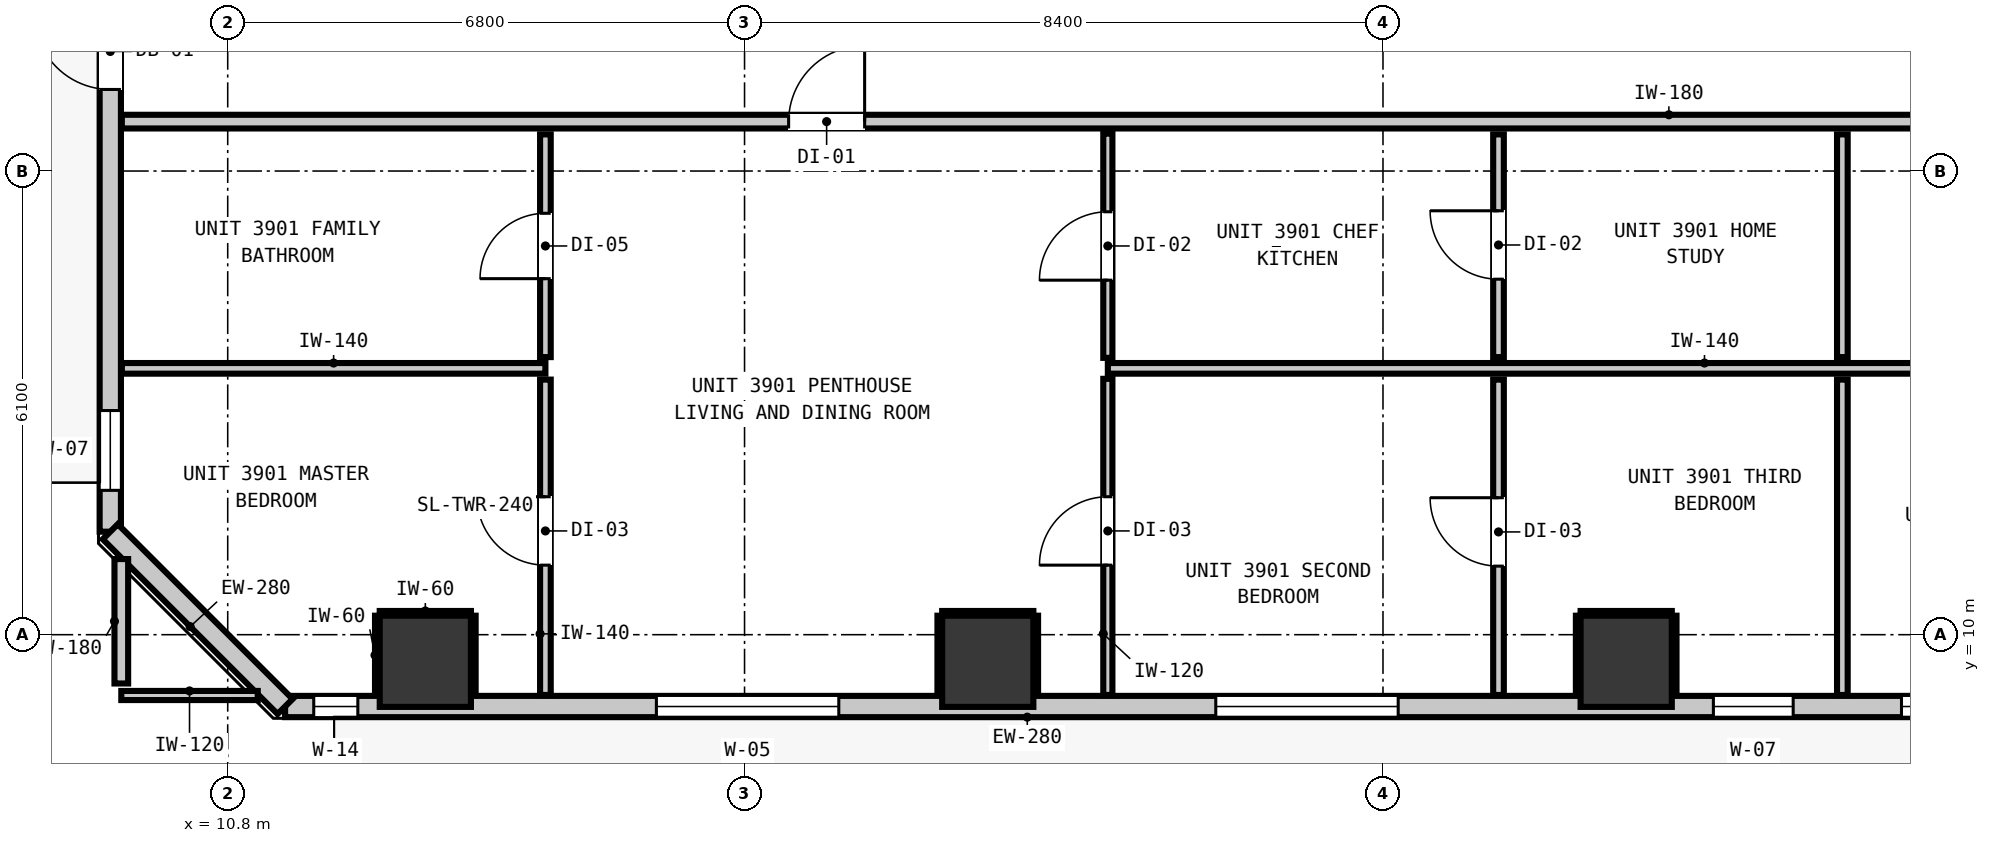
"""IFC4 building model, lengths in metres.
Left out: names, types, materials, properties, quantities, classifications, styles, units other than length and angle.
Written with IfcOpenShell. Run it as: python <this file> out.ifc"""

import sys

from ifc_helpers import new_model, si_unit, direction, frame, frame_2d, origin, origin_2d, place, context, subcontext, project, spatial, rectangle, extrude, element, fill, save


model = new_model("IFC4")
c1 = context("Model", 3, precision=1e-05, world=origin(), true_north=direction((0.0, 1.0)))
c2 = subcontext(c1, "Body", "Model", "MODEL_VIEW")
j1 = project(units=[si_unit("LENGTHUNIT", "METRE"), si_unit("PLANEANGLEUNIT", "RADIAN")], contexts=[c1])
p1 = place(None, origin())
s1 = spatial("IfcSite", under=j1, at=p1, CompositionType="ELEMENT")
p2 = place(p1, origin())
s2 = spatial("IfcBuilding", under=s1, at=p2, CompositionType="ELEMENT")
p3 = place(p2, frame((0.0, 0.0, 135.96)))
s3 = spatial("IfcBuildingStorey", under=s2, at=p3, CompositionType="ELEMENT", Elevation=135.96)
for number, where, z_axis, x_axis in (
    (1, (13.4, 9.65, 0.0), (0.0, 0.0, 1.0), (1.0, 0.0, 0.0)),
    (2, (20.8, 9.65, 0.0), (0.0, 0.0, 1.0), (1.0, 0.0, 0.0)),
    (3, (29.2, 9.65, 0.0), (0.0, 0.0, 1.0), (1.0, 0.0, 0.0)),
):
    element("IfcColumn", number, at=place(p3, frame(where, z_axis=z_axis, x_axis=x_axis)), inside=s3, PredefinedType="COLUMN", context=c2, shape_type="SweptSolid", body=[
        extrude(rectangle(XDim=1.2, YDim=1.2, at=origin_2d()), origin(), (0.0, 0.0, 1.0), 3.32),
    ])
p4 = place(p3, frame((9.255, 11.355, 0.0), z_axis=(0.0, 0.0, 1.0), x_axis=(0.0, 1.0, 0.0)))
e4 = element("IfcWall", 4, at=p4, inside=s3, PredefinedType="STANDARD", context=c2, shape_type="SweptSolid", body=[
    extrude(rectangle(XDim=32.29, YDim=0.28, at=frame_2d((16.145, 0.0))), origin(), (0.0, 0.0, 1.0), 3.08),
])
p5 = place(p4, frame((5.818, 0.0, 0.0)))
e5 = element("IfcOpeningElement", 5, at=p5, cuts=e4, PredefinedType="OPENING", context=c2, shape_type="SweptSolid", body=[
    extrude(rectangle(XDim=1.0, YDim=2.15, at=frame_2d((0.5, 1.075))), frame((0.0, 0.15, 0.0), z_axis=(0.0, -1.0, 0.0), x_axis=(1.0, 0.0, 0.0)), (0.0, 0.0, 1.0), 0.3),
])
p6 = place(p4, frame((0.544, 0.0, 0.85)))
e6 = element("IfcOpeningElement", 6, at=p6, cuts=e4, PredefinedType="OPENING", context=c2, shape_type="SweptSolid", body=[
    extrude(rectangle(XDim=1.05, YDim=1.65, at=frame_2d((0.525, 0.825))), frame((0.0, 0.15, 0.0), z_axis=(0.0, -1.0, 0.0), x_axis=(1.0, 0.0, 0.0)), (0.0, 0.0, 1.0), 0.3),
])
p7 = place(p3, frame((46.645, 9.055, 0.0), z_axis=(0.0, 0.0, 1.0), x_axis=(-1.0, 0.0, 0.0)))
e7 = element("IfcWall", 7, at=p7, inside=s3, PredefinedType="STANDARD", context=c2, shape_type="SweptSolid", body=[
    extrude(rectangle(XDim=35.09, YDim=0.28, at=frame_2d((17.545, 0.0))), origin(), (0.0, 0.0, 1.0), 3.08),
])
p8 = place(p7, frame((0.904, 0.0, 0.0)))
e8 = element("IfcOpeningElement", 8, at=p8, cuts=e7, PredefinedType="OPENING", context=c2, shape_type="SweptSolid", body=[
    extrude(rectangle(XDim=1.0, YDim=2.15, at=frame_2d((0.5, 1.075))), frame((0.0, 0.15, 0.0), z_axis=(0.0, -1.0, 0.0), x_axis=(1.0, 0.0, 0.0)), (0.0, 0.0, 1.0), 0.3),
])
p9 = place(p7, frame((27.805, 0.0, 0.85)))
e9 = element("IfcOpeningElement", 9, at=p9, cuts=e7, PredefinedType="OPENING", context=c2, shape_type="SweptSolid", body=[
    extrude(rectangle(XDim=2.4, YDim=1.95, at=frame_2d((1.2, 0.975))), frame((0.0, 0.15, 0.0), z_axis=(0.0, -1.0, 0.0), x_axis=(1.0, 0.0, 0.0)), (0.0, 0.0, 1.0), 0.3),
])
p10 = place(p7, frame((34.133, 0.0, 0.85)))
e10 = element("IfcOpeningElement", 10, at=p10, cuts=e7, PredefinedType="OPENING", context=c2, shape_type="SweptSolid", body=[
    extrude(rectangle(XDim=0.58, YDim=1.5, at=frame_2d((0.29, 0.75))), frame((0.0, 0.15, 0.0), z_axis=(0.0, -1.0, 0.0), x_axis=(1.0, 0.0, 0.0)), (0.0, 0.0, 1.0), 0.3),
])
p11 = place(p7, frame((20.445, 0.0, 0.85)))
e11 = element("IfcOpeningElement", 11, at=p11, cuts=e7, PredefinedType="OPENING", context=c2, shape_type="SweptSolid", body=[
    extrude(rectangle(XDim=2.4, YDim=1.95, at=frame_2d((1.2, 0.975))), frame((0.0, 0.15, 0.0), z_axis=(0.0, -1.0, 0.0), x_axis=(1.0, 0.0, 0.0)), (0.0, 0.0, 1.0), 0.3),
])
p12 = place(p7, frame((15.248, 0.0, 0.85)))
e12 = element("IfcOpeningElement", 12, at=p12, cuts=e7, PredefinedType="OPENING", context=c2, shape_type="SweptSolid", body=[
    extrude(rectangle(XDim=1.05, YDim=1.65, at=frame_2d((0.525, 0.825))), frame((0.0, 0.15, 0.0), z_axis=(0.0, -1.0, 0.0), x_axis=(1.0, 0.0, 0.0)), (0.0, 0.0, 1.0), 0.3),
])
p13 = place(p7, frame((4.602, 0.0, 0.85)))
e13 = element("IfcOpeningElement", 13, at=p13, cuts=e7, PredefinedType="OPENING", context=c2, shape_type="SweptSolid", body=[
    extrude(rectangle(XDim=2.4, YDim=1.95, at=frame_2d((1.2, 0.975))), frame((0.0, 0.15, 0.0), z_axis=(0.0, -1.0, 0.0), x_axis=(1.0, 0.0, 0.0)), (0.0, 0.0, 1.0), 0.3),
])
p14 = place(p7, frame((11.423, 0.0, 0.85)))
e14 = element("IfcOpeningElement", 14, at=p14, cuts=e7, PredefinedType="OPENING", context=c2, shape_type="SweptSolid", body=[
    extrude(rectangle(XDim=2.4, YDim=1.95, at=frame_2d((1.2, 0.975))), frame((0.0, 0.15, 0.0), z_axis=(0.0, -1.0, 0.0), x_axis=(1.0, 0.0, 0.0)), (0.0, 0.0, 1.0), 0.3),
])
p15 = place(p3, frame((11.555, 9.055, 0.0), z_axis=(0.0, 0.0, 1.0), x_axis=(-0.707106781187, 0.707106781187, 0.0)))
e15 = element("IfcWall", 15, at=p15, inside=s3, PredefinedType="STANDARD", context=c2, shape_type="SweptSolid", body=[
    extrude(rectangle(XDim=3.253, YDim=0.28, at=frame_2d((1.626, 0.0))), origin(), (0.0, 0.0, 1.0), 3.08),
])
p16 = place(p3, frame((9.407, 16.75, 0.0), z_axis=(0.0, 0.0, 1.0), x_axis=(1.0, 0.0, 0.0)))
e16 = element("IfcWall", 16, at=p16, inside=s3, PredefinedType="PARTITIONING", context=c2, shape_type="SweptSolid", body=[
    extrude(rectangle(XDim=39.386, YDim=0.18, at=frame_2d((19.693, 0.0))), origin(), (0.0, 0.0, 1.0), 3.08),
])
p17 = place(p16, frame((8.773, 0.0, 0.0)))
e17 = element("IfcOpeningElement", 17, at=p17, cuts=e16, PredefinedType="OPENING", context=c2, shape_type="SweptSolid", body=[
    extrude(rectangle(XDim=1.0, YDim=2.15, at=frame_2d((0.5, 1.075))), frame((0.0, 0.1, 0.0), z_axis=(0.0, -1.0, 0.0), x_axis=(1.0, 0.0, 0.0)), (0.0, 0.0, 1.0), 0.2),
])
p18 = place(p16, frame((30.936, 0.0, 0.0)))
e18 = element("IfcOpeningElement", 18, at=p18, cuts=e16, PredefinedType="OPENING", context=c2, shape_type="SweptSolid", body=[
    extrude(rectangle(XDim=1.0, YDim=2.15, at=frame_2d((0.5, 1.075))), frame((0.0, 0.1, 0.0), z_axis=(0.0, -1.0, 0.0), x_axis=(1.0, 0.0, 0.0)), (0.0, 0.0, 1.0), 0.2),
])
p19 = place(p3, frame((9.407, 13.504, 0.0), z_axis=(0.0, 0.0, 1.0), x_axis=(1.0, 0.0, 0.0)))
e19 = element("IfcWall", 19, at=p19, inside=s3, PredefinedType="PARTITIONING", context=c2, shape_type="SweptSolid", body=[
    extrude(rectangle(XDim=5.573, YDim=0.14, at=frame_2d((2.787, 0.0))), origin(), (0.0, 0.0, 1.0), 3.08),
])
p20 = place(p3, frame((22.38, 13.504, 0.0), z_axis=(0.0, 0.0, 1.0), x_axis=(1.0, 0.0, 0.0)))
e20 = element("IfcWall", 20, at=p20, inside=s3, PredefinedType="PARTITIONING", context=c2, shape_type="SweptSolid", body=[
    extrude(rectangle(XDim=15.7, YDim=0.14, at=frame_2d((7.85, 0.0))), origin(), (0.0, 0.0, 1.0), 3.08),
])
p21 = place(p3, frame((9.4, 9.2, 0.0), z_axis=(0.0, 0.0, 1.0), x_axis=(1.0, 0.0, 0.0)))
e21 = element("IfcWall", 21, at=p21, inside=s3, PredefinedType="PARTITIONING", context=c2, shape_type="SweptSolid", body=[
    extrude(rectangle(XDim=1.795, YDim=0.12, at=frame_2d((0.897, 0.0))), origin(), (0.0, 0.0, 1.0), 3.08),
])
p22 = place(p3, frame((9.4, 9.358, 0.0), z_axis=(0.0, 0.0, 1.0), x_axis=(0.0, 1.0, 0.0)))
e22 = element("IfcWall", 22, at=p22, inside=s3, PredefinedType="PARTITIONING", context=c2, shape_type="SweptSolid", body=[
    extrude(rectangle(XDim=1.637, YDim=0.18, at=frame_2d((0.819, 0.0))), origin(), (0.0, 0.0, 1.0), 3.08),
])
p23 = place(p3, frame((14.98, 9.207, 0.0), z_axis=(0.0, 0.0, 1.0), x_axis=(0.0, 1.0, 0.0)))
e23 = element("IfcWall", 23, at=p23, inside=s3, PredefinedType="PARTITIONING", context=c2, shape_type="SweptSolid", body=[
    extrude(rectangle(XDim=4.149, YDim=0.14, at=frame_2d((2.074, 0.0))), origin(), (0.0, 0.0, 1.0), 3.08),
])
p24 = place(p23, frame((1.708, 0.0, 0.0)))
e24 = element("IfcOpeningElement", 24, at=p24, cuts=e23, PredefinedType="OPENING", context=c2, shape_type="SweptSolid", body=[
    extrude(rectangle(XDim=0.9, YDim=2.1, at=frame_2d((0.45, 1.05))), frame((0.0, 0.08, 0.0), z_axis=(0.0, -1.0, 0.0), x_axis=(1.0, 0.0, 0.0)), (0.0, 0.0, 1.0), 0.16),
])
p25 = place(p3, frame((14.98, 13.652, 0.0), z_axis=(0.0, 0.0, 1.0), x_axis=(0.0, 1.0, 0.0)))
e25 = element("IfcWall", 25, at=p25, inside=s3, PredefinedType="PARTITIONING", context=c2, shape_type="SweptSolid", body=[
    extrude(rectangle(XDim=2.93, YDim=0.14, at=frame_2d((1.465, 0.0))), origin(), (0.0, 0.0, 1.0), 3.08),
])
p26 = place(p25, frame((1.032, 0.0, 0.0)))
e26 = element("IfcOpeningElement", 26, at=p26, cuts=e25, PredefinedType="OPENING", context=c2, shape_type="SweptSolid", body=[
    extrude(rectangle(XDim=0.86, YDim=2.02, at=frame_2d((0.43, 1.01))), frame((0.0, 0.08, 0.0), z_axis=(0.0, -1.0, 0.0), x_axis=(1.0, 0.0, 0.0)), (0.0, 0.0, 1.0), 0.16),
])
p27 = place(p3, frame((27.52, 9.207, 0.0), z_axis=(0.0, 0.0, 1.0), x_axis=(0.0, 1.0, 0.0)))
e27 = element("IfcWall", 27, at=p27, inside=s3, PredefinedType="PARTITIONING", context=c2, shape_type="SweptSolid", body=[
    extrude(rectangle(XDim=4.149, YDim=0.14, at=frame_2d((2.074, 0.0))), origin(), (0.0, 0.0, 1.0), 3.08),
])
p28 = place(p27, frame((1.695, 0.0, 0.0)))
e28 = element("IfcOpeningElement", 28, at=p28, cuts=e27, PredefinedType="OPENING", context=c2, shape_type="SweptSolid", body=[
    extrude(rectangle(XDim=0.9, YDim=2.1, at=frame_2d((0.45, 1.05))), frame((0.0, 0.08, 0.0), z_axis=(0.0, -1.0, 0.0), x_axis=(1.0, 0.0, 0.0)), (0.0, 0.0, 1.0), 0.16),
])
p29 = place(p3, frame((27.52, 13.652, 0.0), z_axis=(0.0, 0.0, 1.0), x_axis=(0.0, 1.0, 0.0)))
e29 = element("IfcWall", 29, at=p29, inside=s3, PredefinedType="PARTITIONING", context=c2, shape_type="SweptSolid", body=[
    extrude(rectangle(XDim=2.93, YDim=0.14, at=frame_2d((1.465, 0.0))), origin(), (0.0, 0.0, 1.0), 3.08),
])
p30 = place(p29, frame((1.025, 0.0, 0.0)))
e30 = element("IfcOpeningElement", 30, at=p30, cuts=e29, PredefinedType="OPENING", context=c2, shape_type="SweptSolid", body=[
    extrude(rectangle(XDim=0.9, YDim=2.1, at=frame_2d((0.45, 1.05))), frame((0.0, 0.08, 0.0), z_axis=(0.0, -1.0, 0.0), x_axis=(1.0, 0.0, 0.0)), (0.0, 0.0, 1.0), 0.16),
])
p31 = place(p3, frame((32.044, 9.207, 0.0), z_axis=(0.0, 0.0, 1.0), x_axis=(0.0, 1.0, 0.0)))
e31 = element("IfcWall", 31, at=p31, inside=s3, PredefinedType="PARTITIONING", context=c2, shape_type="SweptSolid", body=[
    extrude(rectangle(XDim=4.149, YDim=0.14, at=frame_2d((2.074, 0.0))), origin(), (0.0, 0.0, 1.0), 3.08),
])
p32 = place(p3, frame((32.044, 13.652, 0.0), z_axis=(0.0, 0.0, 1.0), x_axis=(0.0, 1.0, 0.0)))
e32 = element("IfcWall", 32, at=p32, inside=s3, PredefinedType="PARTITIONING", context=c2, shape_type="SweptSolid", body=[
    extrude(rectangle(XDim=2.93, YDim=0.14, at=frame_2d((1.465, 0.0))), origin(), (0.0, 0.0, 1.0), 3.08),
])
p33 = place(p3, frame((22.38, 9.207, 0.0), z_axis=(0.0, 0.0, 1.0), x_axis=(0.0, 1.0, 0.0)))
e33 = element("IfcWall", 33, at=p33, inside=s3, PredefinedType="PARTITIONING", context=c2, shape_type="SweptSolid", body=[
    extrude(rectangle(XDim=4.159, YDim=0.12, at=frame_2d((2.08, 0.0))), origin(), (0.0, 0.0, 1.0), 3.08),
])
p34 = place(p33, frame((1.708, 0.0, 0.0)))
e34 = element("IfcOpeningElement", 34, at=p34, cuts=e33, PredefinedType="OPENING", context=c2, shape_type="SweptSolid", body=[
    extrude(rectangle(XDim=0.9, YDim=2.1, at=frame_2d((0.45, 1.05))), frame((0.0, 0.07, 0.0), z_axis=(0.0, -1.0, 0.0), x_axis=(1.0, 0.0, 0.0)), (0.0, 0.0, 1.0), 0.14),
])
p35 = place(p3, frame((22.38, 13.642, 0.0), z_axis=(0.0, 0.0, 1.0), x_axis=(0.0, 1.0, 0.0)))
e35 = element("IfcWall", 35, at=p35, inside=s3, PredefinedType="PARTITIONING", context=c2, shape_type="SweptSolid", body=[
    extrude(rectangle(XDim=2.95, YDim=0.12, at=frame_2d((1.475, 0.0))), origin(), (0.0, 0.0, 1.0), 3.08),
])
p36 = place(p35, frame((1.022, 0.0, 0.0)))
e36 = element("IfcOpeningElement", 36, at=p36, cuts=e35, PredefinedType="OPENING", context=c2, shape_type="SweptSolid", body=[
    extrude(rectangle(XDim=0.9, YDim=2.1, at=frame_2d((0.45, 1.05))), frame((0.0, 0.07, 0.0), z_axis=(0.0, -1.0, 0.0), x_axis=(1.0, 0.0, 0.0)), (0.0, 0.0, 1.0), 0.14),
])
p37 = place(p3, frame((12.8, 10.282, 0.0), z_axis=(0.0, 0.0, 1.0), x_axis=(1.0, 0.0, 0.0)))
e37 = element("IfcWall", 37, at=p37, inside=s3, PredefinedType="PARTITIONING", context=c2, shape_type="SweptSolid", body=[
    extrude(rectangle(XDim=1.2, YDim=0.06, at=frame_2d((0.6, 0.0))), origin(), (0.0, 0.0, 1.0), 1.45),
])
for number, where, z_axis, x_axis in (
    (38, (12.768, 9.21, 0.0), (0.0, 0.0, 1.0), (0.0, 1.0, 0.0)),
    (39, (14.032, 9.21, 0.0), (0.0, 0.0, 1.0), (0.0, 1.0, 0.0)),
):
    element("IfcWall", number, at=place(p3, frame(where, z_axis=z_axis, x_axis=x_axis)), inside=s3, PredefinedType="PARTITIONING", context=c2, shape_type="SweptSolid", body=[
        extrude(rectangle(XDim=1.04, YDim=0.06, at=frame_2d((0.52, 0.0))), origin(), (0.0, 0.0, 1.0), 1.45),
    ])
p38 = place(p3, frame((20.2, 10.282, 0.0), z_axis=(0.0, 0.0, 1.0), x_axis=(1.0, 0.0, 0.0)))
e40 = element("IfcWall", 40, at=p38, inside=s3, PredefinedType="PARTITIONING", context=c2, shape_type="SweptSolid", body=[
    extrude(rectangle(XDim=1.2, YDim=0.06, at=frame_2d((0.6, 0.0))), origin(), (0.0, 0.0, 1.0), 1.45),
])
for number, where, z_axis, x_axis in (
    (41, (20.168, 9.21, 0.0), (0.0, 0.0, 1.0), (0.0, 1.0, 0.0)),
    (42, (21.432, 9.21, 0.0), (0.0, 0.0, 1.0), (0.0, 1.0, 0.0)),
):
    element("IfcWall", number, at=place(p3, frame(where, z_axis=z_axis, x_axis=x_axis)), inside=s3, PredefinedType="PARTITIONING", context=c2, shape_type="SweptSolid", body=[
        extrude(rectangle(XDim=1.04, YDim=0.06, at=frame_2d((0.52, 0.0))), origin(), (0.0, 0.0, 1.0), 1.45),
    ])
p39 = place(p3, frame((28.6, 10.282, 0.0), z_axis=(0.0, 0.0, 1.0), x_axis=(1.0, 0.0, 0.0)))
e43 = element("IfcWall", 43, at=p39, inside=s3, PredefinedType="PARTITIONING", context=c2, shape_type="SweptSolid", body=[
    extrude(rectangle(XDim=1.2, YDim=0.06, at=frame_2d((0.6, 0.0))), origin(), (0.0, 0.0, 1.0), 1.45),
])
for number, where, z_axis, x_axis in (
    (44, (28.568, 9.21, 0.0), (0.0, 0.0, 1.0), (0.0, 1.0, 0.0)),
    (45, (29.832, 9.21, 0.0), (0.0, 0.0, 1.0), (0.0, 1.0, 0.0)),
):
    element("IfcWall", number, at=place(p3, frame(where, z_axis=z_axis, x_axis=x_axis)), inside=s3, PredefinedType="PARTITIONING", context=c2, shape_type="SweptSolid", body=[
        extrude(rectangle(XDim=1.04, YDim=0.06, at=frame_2d((0.52, 0.0))), origin(), (0.0, 0.0, 1.0), 1.45),
    ])
p40 = place(p5, origin())
e46 = element("IfcDoor", 46, at=p40, inside=s3, OperationType="SINGLE_SWING_RIGHT", PredefinedType="DOOR", context=c2, shape_type="SweptSolid", body=[
    extrude(rectangle(XDim=1.0, YDim=2.15, at=frame_2d((0.5, 1.075))), frame((0.0, 0.025, 0.0), z_axis=(0.0, -1.0, 0.0), x_axis=(1.0, 0.0, 0.0)), (0.0, 0.0, 1.0), 0.05),
])
fill(e5, e46)
p41 = place(p6, origin())
e47 = element("IfcWindow", 47, at=p41, inside=s3, PartitioningType="SINGLE_PANEL", PredefinedType="WINDOW", context=c2, shape_type="SweptSolid", body=[
    extrude(rectangle(XDim=1.05, YDim=1.65, at=frame_2d((0.525, 0.825))), frame((0.0, 0.03, 0.0), z_axis=(0.0, -1.0, 0.0), x_axis=(1.0, 0.0, 0.0)), (0.0, 0.0, 1.0), 0.06),
])
fill(e6, e47)
p42 = place(p9, origin())
e48 = element("IfcWindow", 48, at=p42, inside=s3, PartitioningType="SINGLE_PANEL", PredefinedType="WINDOW", context=c2, shape_type="SweptSolid", body=[
    extrude(rectangle(XDim=2.4, YDim=1.95, at=frame_2d((1.2, 0.975))), frame((0.0, 0.03, 0.0), z_axis=(0.0, -1.0, 0.0), x_axis=(1.0, 0.0, 0.0)), (0.0, 0.0, 1.0), 0.06),
])
fill(e9, e48)
p43 = place(p10, origin())
e49 = element("IfcWindow", 49, at=p43, inside=s3, PartitioningType="SINGLE_PANEL", PredefinedType="WINDOW", context=c2, shape_type="SweptSolid", body=[
    extrude(rectangle(XDim=0.58, YDim=1.5, at=frame_2d((0.29, 0.75))), frame((0.0, 0.03, 0.0), z_axis=(0.0, -1.0, 0.0), x_axis=(1.0, 0.0, 0.0)), (0.0, 0.0, 1.0), 0.06),
])
fill(e10, e49)
p44 = place(p11, origin())
e50 = element("IfcWindow", 50, at=p44, inside=s3, PartitioningType="SINGLE_PANEL", PredefinedType="WINDOW", context=c2, shape_type="SweptSolid", body=[
    extrude(rectangle(XDim=2.4, YDim=1.95, at=frame_2d((1.2, 0.975))), frame((0.0, 0.03, 0.0), z_axis=(0.0, -1.0, 0.0), x_axis=(1.0, 0.0, 0.0)), (0.0, 0.0, 1.0), 0.06),
])
fill(e11, e50)
p45 = place(p12, origin())
e51 = element("IfcWindow", 51, at=p45, inside=s3, PartitioningType="SINGLE_PANEL", PredefinedType="WINDOW", context=c2, shape_type="SweptSolid", body=[
    extrude(rectangle(XDim=1.05, YDim=1.65, at=frame_2d((0.525, 0.825))), frame((0.0, 0.03, 0.0), z_axis=(0.0, -1.0, 0.0), x_axis=(1.0, 0.0, 0.0)), (0.0, 0.0, 1.0), 0.06),
])
fill(e12, e51)
p46 = place(p14, origin())
e52 = element("IfcWindow", 52, at=p46, inside=s3, PartitioningType="SINGLE_PANEL", PredefinedType="WINDOW", context=c2, shape_type="SweptSolid", body=[
    extrude(rectangle(XDim=2.4, YDim=1.95, at=frame_2d((1.2, 0.975))), frame((0.0, 0.03, 0.0), z_axis=(0.0, -1.0, 0.0), x_axis=(1.0, 0.0, 0.0)), (0.0, 0.0, 1.0), 0.06),
])
fill(e14, e52)
p47 = place(p17, origin())
e53 = element("IfcDoor", 53, at=p47, inside=s3, OperationType="SINGLE_SWING_RIGHT", PredefinedType="DOOR", context=c2, shape_type="SweptSolid", body=[
    extrude(rectangle(XDim=1.0, YDim=2.15, at=frame_2d((0.5, 1.075))), frame((0.0, 0.025, 0.0), z_axis=(0.0, -1.0, 0.0), x_axis=(1.0, 0.0, 0.0)), (0.0, 0.0, 1.0), 0.05),
])
fill(e17, e53)
p48 = place(p26, origin())
e54 = element("IfcDoor", 54, at=p48, inside=s3, OperationType="SINGLE_SWING_LEFT", PredefinedType="DOOR", context=c2, shape_type="SweptSolid", body=[
    extrude(rectangle(XDim=0.86, YDim=2.02, at=frame_2d((0.43, 1.01))), frame((0.0, 0.025, 0.0), z_axis=(0.0, -1.0, 0.0), x_axis=(1.0, 0.0, 0.0)), (0.0, 0.0, 1.0), 0.05),
])
fill(e26, e54)
p49 = place(p24, origin())
e55 = element("IfcDoor", 55, at=p49, inside=s3, OperationType="SINGLE_SWING_RIGHT", PredefinedType="DOOR", context=c2, shape_type="SweptSolid", body=[
    extrude(rectangle(XDim=0.9, YDim=2.1, at=frame_2d((0.45, 1.05))), frame((0.0, 0.025, 0.0), z_axis=(0.0, -1.0, 0.0), x_axis=(1.0, 0.0, 0.0)), (0.0, 0.0, 1.0), 0.05),
])
fill(e24, e55)
p50 = place(p36, origin())
e56 = element("IfcDoor", 56, at=p50, inside=s3, OperationType="SINGLE_SWING_LEFT", PredefinedType="DOOR", context=c2, shape_type="SweptSolid", body=[
    extrude(rectangle(XDim=0.9, YDim=2.1, at=frame_2d((0.45, 1.05))), frame((0.0, 0.025, 0.0), z_axis=(0.0, -1.0, 0.0), x_axis=(1.0, 0.0, 0.0)), (0.0, 0.0, 1.0), 0.05),
])
fill(e36, e56)
p51 = place(p30, origin())
e57 = element("IfcDoor", 57, at=p51, inside=s3, OperationType="SINGLE_SWING_RIGHT", PredefinedType="DOOR", context=c2, shape_type="SweptSolid", body=[
    extrude(rectangle(XDim=0.9, YDim=2.1, at=frame_2d((0.45, 1.05))), frame((0.0, 0.025, 0.0), z_axis=(0.0, -1.0, 0.0), x_axis=(1.0, 0.0, 0.0)), (0.0, 0.0, 1.0), 0.05),
])
fill(e30, e57)
p52 = place(p34, origin())
e58 = element("IfcDoor", 58, at=p52, inside=s3, OperationType="SINGLE_SWING_LEFT", PredefinedType="DOOR", context=c2, shape_type="SweptSolid", body=[
    extrude(rectangle(XDim=0.9, YDim=2.1, at=frame_2d((0.45, 1.05))), frame((0.0, 0.025, 0.0), z_axis=(0.0, -1.0, 0.0), x_axis=(1.0, 0.0, 0.0)), (0.0, 0.0, 1.0), 0.05),
])
fill(e34, e58)
p53 = place(p28, origin())
e59 = element("IfcDoor", 59, at=p53, inside=s3, OperationType="SINGLE_SWING_RIGHT", PredefinedType="DOOR", context=c2, shape_type="SweptSolid", body=[
    extrude(rectangle(XDim=0.9, YDim=2.1, at=frame_2d((0.45, 1.05))), frame((0.0, 0.025, 0.0), z_axis=(0.0, -1.0, 0.0), x_axis=(1.0, 0.0, 0.0)), (0.0, 0.0, 1.0), 0.05),
])
fill(e28, e59)
save(model, sys.argv[1])
